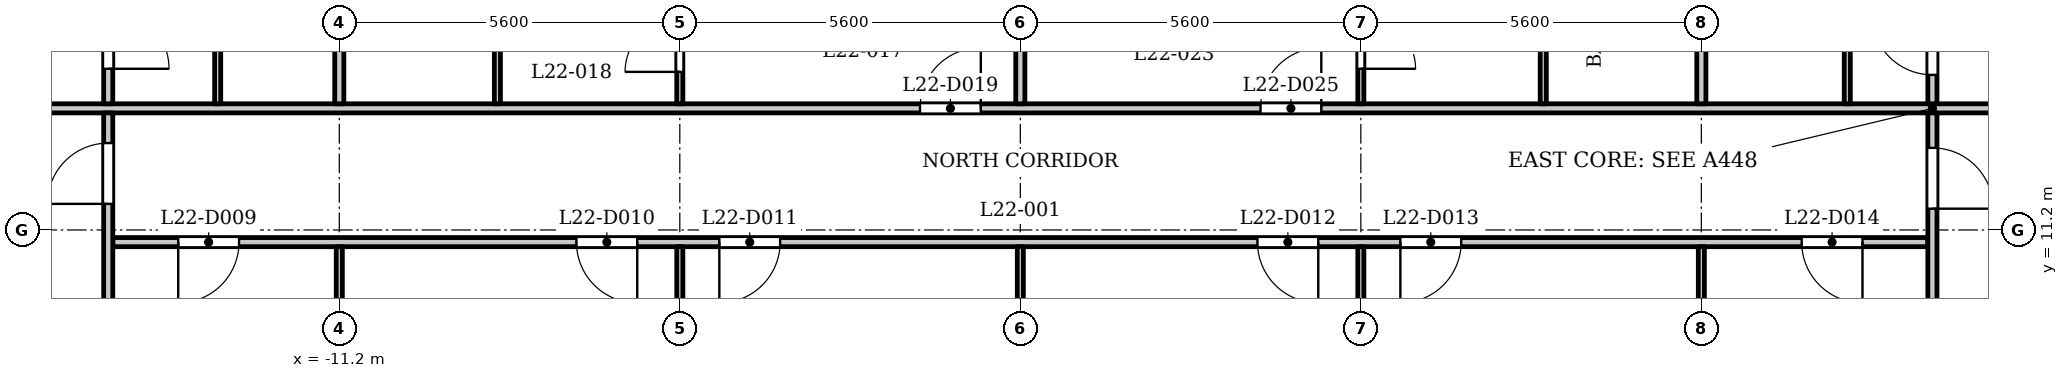
"""IFC4 building model, lengths in metres.
Left out: names, types, materials, properties, quantities, classifications, styles, units other than length and angle.
Written with IfcOpenShell. Run it as: python <this file> out.ifc"""

import sys

from ifc_helpers import new_model, si_unit, direction, frame, frame_2d, origin, place, context, subcontext, project, spatial, rectangle, extrude, element, fill, save


model = new_model("IFC4")
c1 = context("Model", 3, precision=1e-05, world=origin(), true_north=direction((0.0, 1.0)))
c2 = subcontext(c1, "Body", "Model", "MODEL_VIEW")
j1 = project(units=[si_unit("LENGTHUNIT", "METRE"), si_unit("PLANEANGLEUNIT", "RADIAN")], contexts=[c1])
p1 = place(None, origin())
s1 = spatial("IfcSite", under=j1, at=p1, CompositionType="ELEMENT")
p2 = place(p1, origin())
s2 = spatial("IfcBuilding", under=s1, at=p2, CompositionType="ELEMENT")
p3 = place(p2, frame((0.0, 0.0, 90.3)))
s3 = spatial("IfcBuildingStorey", under=s2, at=p3, CompositionType="ELEMENT", Elevation=90.3)
p4 = place(p3, frame((-14.925, 11.0, 0.0), z_axis=(0.0, 0.0, 1.0), x_axis=(1.0, 0.0, 0.0)))
e1 = element("IfcWall", 1, at=p4, inside=s3, PredefinedType="PARTITIONING", context=c2, shape_type="SweptSolid", body=[
    extrude(rectangle(XDim=29.85, YDim=0.15, at=frame_2d((14.925, 0.0))), origin(), (0.0, 0.0, 1.0), 3.2),
])
p5 = place(p4, frame((1.076, 0.0, 0.0)))
e2 = element("IfcOpeningElement", 2, at=p5, cuts=e1, PredefinedType="OPENING", context=c2, shape_type="SweptSolid", body=[
    extrude(rectangle(XDim=1.0, YDim=2.1, at=frame_2d((0.5, 1.05))), frame((0.0, 0.085, 0.0), z_axis=(0.0, -1.0, 0.0), x_axis=(1.0, 0.0, 0.0)), (0.0, 0.0, 1.0), 0.17),
])
p6 = place(p4, frame((7.625, 0.0, 0.0)))
e3 = element("IfcOpeningElement", 3, at=p6, cuts=e1, PredefinedType="OPENING", context=c2, shape_type="SweptSolid", body=[
    extrude(rectangle(XDim=1.0, YDim=2.1, at=frame_2d((0.5, 1.05))), frame((0.0, 0.085, 0.0), z_axis=(0.0, -1.0, 0.0), x_axis=(1.0, 0.0, 0.0)), (0.0, 0.0, 1.0), 0.17),
])
p7 = place(p4, frame((9.975, 0.0, 0.0)))
e4 = element("IfcOpeningElement", 4, at=p7, cuts=e1, PredefinedType="OPENING", context=c2, shape_type="SweptSolid", body=[
    extrude(rectangle(XDim=1.0, YDim=2.1, at=frame_2d((0.5, 1.05))), frame((0.0, 0.085, 0.0), z_axis=(0.0, -1.0, 0.0), x_axis=(1.0, 0.0, 0.0)), (0.0, 0.0, 1.0), 0.17),
])
p8 = place(p4, frame((18.825, 0.0, 0.0)))
e5 = element("IfcOpeningElement", 5, at=p8, cuts=e1, PredefinedType="OPENING", context=c2, shape_type="SweptSolid", body=[
    extrude(rectangle(XDim=1.0, YDim=2.1, at=frame_2d((0.5, 1.05))), frame((0.0, 0.085, 0.0), z_axis=(0.0, -1.0, 0.0), x_axis=(1.0, 0.0, 0.0)), (0.0, 0.0, 1.0), 0.17),
])
p9 = place(p4, frame((21.175, 0.0, 0.0)))
e6 = element("IfcOpeningElement", 6, at=p9, cuts=e1, PredefinedType="OPENING", context=c2, shape_type="SweptSolid", body=[
    extrude(rectangle(XDim=1.0, YDim=2.1, at=frame_2d((0.5, 1.05))), frame((0.0, 0.085, 0.0), z_axis=(0.0, -1.0, 0.0), x_axis=(1.0, 0.0, 0.0)), (0.0, 0.0, 1.0), 0.17),
])
p10 = place(p4, frame((27.775, 0.0, 0.0)))
e7 = element("IfcOpeningElement", 7, at=p10, cuts=e1, PredefinedType="OPENING", context=c2, shape_type="SweptSolid", body=[
    extrude(rectangle(XDim=1.0, YDim=2.1, at=frame_2d((0.5, 1.05))), frame((0.0, 0.085, 0.0), z_axis=(0.0, -1.0, 0.0), x_axis=(1.0, 0.0, 0.0)), (0.0, 0.0, 1.0), 0.17),
])
p11 = place(p3, frame((-17.4, 13.2, 0.0), z_axis=(0.0, 0.0, 1.0), x_axis=(1.0, 0.0, 0.0)))
e8 = element("IfcWall", 8, at=p11, inside=s3, PredefinedType="PARTITIONING", context=c2, shape_type="SweptSolid", body=[
    extrude(rectangle(XDim=34.8, YDim=0.15, at=frame_2d((17.4, 0.0))), origin(), (0.0, 0.0, 1.0), 3.2),
])
p12 = place(p11, frame((0.25, 0.0, 0.0)))
e9 = element("IfcOpeningElement", 9, at=p12, cuts=e8, PredefinedType="OPENING", context=c2, shape_type="SweptSolid", body=[
    extrude(rectangle(XDim=1.0, YDim=2.1, at=frame_2d((0.5, 1.05))), frame((0.0, 0.085, 0.0), z_axis=(0.0, -1.0, 0.0), x_axis=(1.0, 0.0, 0.0)), (0.0, 0.0, 1.0), 0.17),
])
p13 = place(p11, frame((33.65, 0.0, 0.0)))
e10 = element("IfcOpeningElement", 10, at=p13, cuts=e8, PredefinedType="OPENING", context=c2, shape_type="SweptSolid", body=[
    extrude(rectangle(XDim=1.0, YDim=2.1, at=frame_2d((0.5, 1.05))), frame((0.0, 0.085, 0.0), z_axis=(0.0, -1.0, 0.0), x_axis=(1.0, 0.0, 0.0)), (0.0, 0.0, 1.0), 0.17),
])
p14 = place(p11, frame((15.75, 0.0, 0.0)))
e11 = element("IfcOpeningElement", 11, at=p14, cuts=e8, PredefinedType="OPENING", context=c2, shape_type="SweptSolid", body=[
    extrude(rectangle(XDim=1.0, YDim=2.1, at=frame_2d((0.5, 1.05))), frame((0.0, 0.085, 0.0), z_axis=(0.0, -1.0, 0.0), x_axis=(1.0, 0.0, 0.0)), (0.0, 0.0, 1.0), 0.17),
])
p15 = place(p11, frame((21.35, 0.0, 0.0)))
e12 = element("IfcOpeningElement", 12, at=p15, cuts=e8, PredefinedType="OPENING", context=c2, shape_type="SweptSolid", body=[
    extrude(rectangle(XDim=1.0, YDim=2.1, at=frame_2d((0.5, 1.05))), frame((0.0, 0.085, 0.0), z_axis=(0.0, -1.0, 0.0), x_axis=(1.0, 0.0, 0.0)), (0.0, 0.0, 1.0), 0.17),
])
p16 = place(p3, frame((-15.0, 6.769, 0.0), z_axis=(0.0, 0.0, 1.0), x_axis=(0.0, 1.0, 0.0)))
e13 = element("IfcWall", 13, at=p16, inside=s3, PredefinedType="PARTITIONING", context=c2, shape_type="SweptSolid", body=[
    extrude(rectangle(XDim=6.356, YDim=0.15, at=frame_2d((3.178, 0.0))), origin(), (0.0, 0.0, 1.0), 3.2),
])
p17 = place(p16, frame((4.86, 0.0, 0.0)))
e14 = element("IfcOpeningElement", 14, at=p17, cuts=e13, PredefinedType="OPENING", context=c2, shape_type="SweptSolid", body=[
    extrude(rectangle(XDim=1.0, YDim=2.1, at=frame_2d((0.5, 1.05))), frame((0.0, 0.085, 0.0), z_axis=(0.0, -1.0, 0.0), x_axis=(1.0, 0.0, 0.0)), (0.0, 0.0, 1.0), 0.17),
])
p18 = place(p3, frame((-15.0, 13.275, 0.0), z_axis=(0.0, 0.0, 1.0), x_axis=(0.0, 1.0, 0.0)))
e15 = element("IfcWall", 15, at=p18, inside=s3, PredefinedType="PARTITIONING", context=c2, shape_type="SweptSolid", body=[
    extrude(rectangle(XDim=2.05, YDim=0.15, at=frame_2d((1.025, 0.0))), origin(), (0.0, 0.0, 1.0), 3.2),
])
p19 = place(p18, frame((0.576, 0.0, 0.0)))
e16 = element("IfcOpeningElement", 16, at=p19, cuts=e15, PredefinedType="OPENING", context=c2, shape_type="SweptSolid", body=[
    extrude(rectangle(XDim=1.0, YDim=2.1, at=frame_2d((0.5, 1.05))), frame((0.0, 0.085, 0.0), z_axis=(0.0, -1.0, 0.0), x_axis=(1.0, 0.0, 0.0)), (0.0, 0.0, 1.0), 0.17),
])
p20 = place(p3, frame((-13.2, 13.275, 0.0), z_axis=(0.0, 0.0, 1.0), x_axis=(0.0, 1.0, 0.0)))
e17 = element("IfcWall", 17, at=p20, inside=s3, PredefinedType="PARTITIONING", context=c2, shape_type="SweptSolid", body=[
    extrude(rectangle(XDim=3.775, YDim=0.1, at=frame_2d((1.888, 0.0))), origin(), (0.0, 0.0, 1.0), 3.2),
])
p21 = place(p3, frame((-11.2, 7.32, 0.0), z_axis=(0.0, 0.0, 1.0), x_axis=(0.0, 1.0, 0.0)))
e18 = element("IfcWall", 18, at=p21, inside=s3, PredefinedType="PARTITIONING", context=c2, shape_type="SweptSolid", body=[
    extrude(rectangle(XDim=3.605, YDim=0.1, at=frame_2d((1.802, 0.0))), origin(), (0.0, 0.0, 1.0), 3.2),
])
p22 = place(p3, frame((-11.2, 13.275, 0.0), z_axis=(0.0, 0.0, 1.0), x_axis=(0.0, 1.0, 0.0)))
e19 = element("IfcWall", 19, at=p22, inside=s3, PredefinedType="PARTITIONING", context=c2, shape_type="SweptSolid", body=[
    extrude(rectangle(XDim=3.775, YDim=0.15, at=frame_2d((1.888, 0.0))), origin(), (0.0, 0.0, 1.0), 3.2),
])
p23 = place(p3, frame((-8.6, 13.275, 0.0), z_axis=(0.0, 0.0, 1.0), x_axis=(0.0, 1.0, 0.0)))
e20 = element("IfcWall", 20, at=p23, inside=s3, PredefinedType="PARTITIONING", context=c2, shape_type="SweptSolid", body=[
    extrude(rectangle(XDim=3.775, YDim=0.1, at=frame_2d((1.888, 0.0))), origin(), (0.0, 0.0, 1.0), 3.2),
])
p24 = place(p3, frame((-5.6, 7.32, 0.0), z_axis=(0.0, 0.0, 1.0), x_axis=(0.0, 1.0, 0.0)))
e21 = element("IfcWall", 21, at=p24, inside=s3, PredefinedType="PARTITIONING", context=c2, shape_type="SweptSolid", body=[
    extrude(rectangle(XDim=3.605, YDim=0.1, at=frame_2d((1.802, 0.0))), origin(), (0.0, 0.0, 1.0), 3.2),
])
p25 = place(p3, frame((-5.6, 13.275, 0.0), z_axis=(0.0, 0.0, 1.0), x_axis=(0.0, 1.0, 0.0)))
e22 = element("IfcWall", 22, at=p25, inside=s3, PredefinedType="PARTITIONING", context=c2, shape_type="SweptSolid", body=[
    extrude(rectangle(XDim=3.775, YDim=0.1, at=frame_2d((1.888, 0.0))), origin(), (0.0, 0.0, 1.0), 3.2),
])
p26 = place(p25, frame((0.525, 0.0, 0.0)))
e23 = element("IfcOpeningElement", 23, at=p26, cuts=e22, PredefinedType="OPENING", context=c2, shape_type="SweptSolid", body=[
    extrude(rectangle(XDim=0.9, YDim=2.1, at=frame_2d((0.45, 1.05))), frame((0.0, 0.06, 0.0), z_axis=(0.0, -1.0, 0.0), x_axis=(1.0, 0.0, 0.0)), (0.0, 0.0, 1.0), 0.12),
])
p27 = place(p3, frame((0.0, 7.32, 0.0), z_axis=(0.0, 0.0, 1.0), x_axis=(0.0, 1.0, 0.0)))
e24 = element("IfcWall", 24, at=p27, inside=s3, PredefinedType="PARTITIONING", context=c2, shape_type="SweptSolid", body=[
    extrude(rectangle(XDim=3.605, YDim=0.1, at=frame_2d((1.802, 0.0))), origin(), (0.0, 0.0, 1.0), 3.2),
])
p28 = place(p3, frame((0.0, 13.275, 0.0), z_axis=(0.0, 0.0, 1.0), x_axis=(0.0, 1.0, 0.0)))
e25 = element("IfcWall", 25, at=p28, inside=s3, PredefinedType="PARTITIONING", context=c2, shape_type="SweptSolid", body=[
    extrude(rectangle(XDim=3.775, YDim=0.15, at=frame_2d((1.888, 0.0))), origin(), (0.0, 0.0, 1.0), 3.2),
])
p29 = place(p3, frame((5.6, 7.32, 0.0), z_axis=(0.0, 0.0, 1.0), x_axis=(0.0, 1.0, 0.0)))
e26 = element("IfcWall", 26, at=p29, inside=s3, PredefinedType="PARTITIONING", context=c2, shape_type="SweptSolid", body=[
    extrude(rectangle(XDim=3.605, YDim=0.1, at=frame_2d((1.802, 0.0))), origin(), (0.0, 0.0, 1.0), 3.2),
])
p30 = place(p3, frame((5.6, 13.275, 0.0), z_axis=(0.0, 0.0, 1.0), x_axis=(0.0, 1.0, 0.0)))
e27 = element("IfcWall", 27, at=p30, inside=s3, PredefinedType="PARTITIONING", context=c2, shape_type="SweptSolid", body=[
    extrude(rectangle(XDim=3.775, YDim=0.1, at=frame_2d((1.888, 0.0))), origin(), (0.0, 0.0, 1.0), 3.2),
])
p31 = place(p30, frame((0.576, 0.0, 0.0)))
e28 = element("IfcOpeningElement", 28, at=p31, cuts=e27, PredefinedType="OPENING", context=c2, shape_type="SweptSolid", body=[
    extrude(rectangle(XDim=0.9, YDim=2.1, at=frame_2d((0.45, 1.05))), frame((0.0, 0.06, 0.0), z_axis=(0.0, -1.0, 0.0), x_axis=(1.0, 0.0, 0.0)), (0.0, 0.0, 1.0), 0.12),
])
p32 = place(p3, frame((8.6, 13.275, 0.0), z_axis=(0.0, 0.0, 1.0), x_axis=(0.0, 1.0, 0.0)))
e29 = element("IfcWall", 29, at=p32, inside=s3, PredefinedType="PARTITIONING", context=c2, shape_type="SweptSolid", body=[
    extrude(rectangle(XDim=3.775, YDim=0.1, at=frame_2d((1.888, 0.0))), origin(), (0.0, 0.0, 1.0), 3.2),
])
p33 = place(p3, frame((11.2, 7.32, 0.0), z_axis=(0.0, 0.0, 1.0), x_axis=(0.0, 1.0, 0.0)))
e30 = element("IfcWall", 30, at=p33, inside=s3, PredefinedType="PARTITIONING", context=c2, shape_type="SweptSolid", body=[
    extrude(rectangle(XDim=3.605, YDim=0.1, at=frame_2d((1.802, 0.0))), origin(), (0.0, 0.0, 1.0), 3.2),
])
p34 = place(p3, frame((11.2, 13.275, 0.0), z_axis=(0.0, 0.0, 1.0), x_axis=(0.0, 1.0, 0.0)))
e31 = element("IfcWall", 31, at=p34, inside=s3, PredefinedType="PARTITIONING", context=c2, shape_type="SweptSolid", body=[
    extrude(rectangle(XDim=3.775, YDim=0.15, at=frame_2d((1.888, 0.0))), origin(), (0.0, 0.0, 1.0), 3.2),
])
p35 = place(p3, frame((13.6, 13.275, 0.0), z_axis=(0.0, 0.0, 1.0), x_axis=(0.0, 1.0, 0.0)))
e32 = element("IfcWall", 32, at=p35, inside=s3, PredefinedType="PARTITIONING", context=c2, shape_type="SweptSolid", body=[
    extrude(rectangle(XDim=3.775, YDim=0.1, at=frame_2d((1.888, 0.0))), origin(), (0.0, 0.0, 1.0), 3.2),
])
p36 = place(p3, frame((15.0, 6.769, 0.0), z_axis=(0.0, 0.0, 1.0), x_axis=(0.0, 1.0, 0.0)))
e33 = element("IfcWall", 33, at=p36, inside=s3, PredefinedType="PARTITIONING", context=c2, shape_type="SweptSolid", body=[
    extrude(rectangle(XDim=6.356, YDim=0.15, at=frame_2d((3.178, 0.0))), origin(), (0.0, 0.0, 1.0), 3.2),
])
p37 = place(p36, frame((4.781, 0.0, 0.0)))
e34 = element("IfcOpeningElement", 34, at=p37, cuts=e33, PredefinedType="OPENING", context=c2, shape_type="SweptSolid", body=[
    extrude(rectangle(XDim=1.0, YDim=2.1, at=frame_2d((0.5, 1.05))), frame((0.0, 0.085, 0.0), z_axis=(0.0, -1.0, 0.0), x_axis=(1.0, 0.0, 0.0)), (0.0, 0.0, 1.0), 0.17),
])
p38 = place(p3, frame((15.0, 13.275, 0.0), z_axis=(0.0, 0.0, 1.0), x_axis=(0.0, 1.0, 0.0)))
e35 = element("IfcWall", 35, at=p38, inside=s3, PredefinedType="PARTITIONING", context=c2, shape_type="SweptSolid", body=[
    extrude(rectangle(XDim=2.05, YDim=0.15, at=frame_2d((1.025, 0.0))), origin(), (0.0, 0.0, 1.0), 3.2),
])
p39 = place(p38, frame((0.476, 0.0, 0.0)))
e36 = element("IfcOpeningElement", 36, at=p39, cuts=e35, PredefinedType="OPENING", context=c2, shape_type="SweptSolid", body=[
    extrude(rectangle(XDim=1.0, YDim=2.1, at=frame_2d((0.5, 1.05))), frame((0.0, 0.085, 0.0), z_axis=(0.0, -1.0, 0.0), x_axis=(1.0, 0.0, 0.0)), (0.0, 0.0, 1.0), 0.17),
])
p40 = place(p17, origin())
e37 = element("IfcDoor", 37, at=p40, inside=s3, OperationType="SINGLE_SWING_RIGHT", PredefinedType="DOOR", context=c2, shape_type="SweptSolid", body=[
    extrude(rectangle(XDim=1.0, YDim=2.1, at=frame_2d((0.5, 1.05))), frame((0.0, 0.025, 0.0), z_axis=(0.0, -1.0, 0.0), x_axis=(1.0, 0.0, 0.0)), (0.0, 0.0, 1.0), 0.05),
])
fill(e14, e37)
p41 = place(p37, origin())
e38 = element("IfcDoor", 38, at=p41, inside=s3, OperationType="SINGLE_SWING_LEFT", PredefinedType="DOOR", context=c2, shape_type="SweptSolid", body=[
    extrude(rectangle(XDim=1.0, YDim=2.1, at=frame_2d((0.5, 1.05))), frame((0.0, 0.025, 0.0), z_axis=(0.0, -1.0, 0.0), x_axis=(1.0, 0.0, 0.0)), (0.0, 0.0, 1.0), 0.05),
])
fill(e34, e38)
p42 = place(p5, origin())
e39 = element("IfcDoor", 39, at=p42, inside=s3, OperationType="SINGLE_SWING_LEFT", PredefinedType="DOOR", context=c2, shape_type="SweptSolid", body=[
    extrude(rectangle(XDim=1.0, YDim=2.1, at=frame_2d((0.5, 1.05))), frame((0.0, 0.025, 0.0), z_axis=(0.0, -1.0, 0.0), x_axis=(1.0, 0.0, 0.0)), (0.0, 0.0, 1.0), 0.05),
])
fill(e2, e39)
p43 = place(p6, origin())
e40 = element("IfcDoor", 40, at=p43, inside=s3, OperationType="SINGLE_SWING_RIGHT", PredefinedType="DOOR", context=c2, shape_type="SweptSolid", body=[
    extrude(rectangle(XDim=1.0, YDim=2.1, at=frame_2d((0.5, 1.05))), frame((0.0, 0.025, 0.0), z_axis=(0.0, -1.0, 0.0), x_axis=(1.0, 0.0, 0.0)), (0.0, 0.0, 1.0), 0.05),
])
fill(e3, e40)
p44 = place(p7, origin())
e41 = element("IfcDoor", 41, at=p44, inside=s3, OperationType="SINGLE_SWING_LEFT", PredefinedType="DOOR", context=c2, shape_type="SweptSolid", body=[
    extrude(rectangle(XDim=1.0, YDim=2.1, at=frame_2d((0.5, 1.05))), frame((0.0, 0.025, 0.0), z_axis=(0.0, -1.0, 0.0), x_axis=(1.0, 0.0, 0.0)), (0.0, 0.0, 1.0), 0.05),
])
fill(e4, e41)
p45 = place(p8, origin())
e42 = element("IfcDoor", 42, at=p45, inside=s3, OperationType="SINGLE_SWING_RIGHT", PredefinedType="DOOR", context=c2, shape_type="SweptSolid", body=[
    extrude(rectangle(XDim=1.0, YDim=2.1, at=frame_2d((0.5, 1.05))), frame((0.0, 0.025, 0.0), z_axis=(0.0, -1.0, 0.0), x_axis=(1.0, 0.0, 0.0)), (0.0, 0.0, 1.0), 0.05),
])
fill(e5, e42)
p46 = place(p9, origin())
e43 = element("IfcDoor", 43, at=p46, inside=s3, OperationType="SINGLE_SWING_LEFT", PredefinedType="DOOR", context=c2, shape_type="SweptSolid", body=[
    extrude(rectangle(XDim=1.0, YDim=2.1, at=frame_2d((0.5, 1.05))), frame((0.0, 0.025, 0.0), z_axis=(0.0, -1.0, 0.0), x_axis=(1.0, 0.0, 0.0)), (0.0, 0.0, 1.0), 0.05),
])
fill(e6, e43)
p47 = place(p10, origin())
e44 = element("IfcDoor", 44, at=p47, inside=s3, OperationType="SINGLE_SWING_RIGHT", PredefinedType="DOOR", context=c2, shape_type="SweptSolid", body=[
    extrude(rectangle(XDim=1.0, YDim=2.1, at=frame_2d((0.5, 1.05))), frame((0.0, 0.025, 0.0), z_axis=(0.0, -1.0, 0.0), x_axis=(1.0, 0.0, 0.0)), (0.0, 0.0, 1.0), 0.05),
])
fill(e7, e44)
p48 = place(p19, origin())
e45 = element("IfcDoor", 45, at=p48, inside=s3, OperationType="SINGLE_SWING_LEFT", PredefinedType="DOOR", context=c2, shape_type="SweptSolid", body=[
    extrude(rectangle(XDim=1.0, YDim=2.1, at=frame_2d((0.5, 1.05))), frame((0.0, 0.025, 0.0), z_axis=(0.0, -1.0, 0.0), x_axis=(1.0, 0.0, 0.0)), (0.0, 0.0, 1.0), 0.05),
])
fill(e16, e45)
p49 = place(p14, origin())
e46 = element("IfcDoor", 46, at=p49, inside=s3, OperationType="SINGLE_SWING_LEFT", PredefinedType="DOOR", context=c2, shape_type="SweptSolid", body=[
    extrude(rectangle(XDim=1.0, YDim=2.1, at=frame_2d((0.5, 1.05))), frame((0.0, 0.025, 0.0), z_axis=(0.0, -1.0, 0.0), x_axis=(1.0, 0.0, 0.0)), (0.0, 0.0, 1.0), 0.05),
])
fill(e11, e46)
p50 = place(p26, origin())
e47 = element("IfcDoor", 47, at=p50, inside=s3, OperationType="SINGLE_SWING_RIGHT", PredefinedType="DOOR", context=c2, shape_type="SweptSolid", body=[
    extrude(rectangle(XDim=0.9, YDim=2.1, at=frame_2d((0.45, 1.05))), frame((0.0, 0.025, 0.0), z_axis=(0.0, -1.0, 0.0), x_axis=(1.0, 0.0, 0.0)), (0.0, 0.0, 1.0), 0.05),
])
fill(e23, e47)
p51 = place(p15, origin())
e48 = element("IfcDoor", 48, at=p51, inside=s3, OperationType="SINGLE_SWING_LEFT", PredefinedType="DOOR", context=c2, shape_type="SweptSolid", body=[
    extrude(rectangle(XDim=1.0, YDim=2.1, at=frame_2d((0.5, 1.05))), frame((0.0, 0.025, 0.0), z_axis=(0.0, -1.0, 0.0), x_axis=(1.0, 0.0, 0.0)), (0.0, 0.0, 1.0), 0.05),
])
fill(e12, e48)
p52 = place(p31, origin())
e49 = element("IfcDoor", 49, at=p52, inside=s3, OperationType="SINGLE_SWING_LEFT", PredefinedType="DOOR", context=c2, shape_type="SweptSolid", body=[
    extrude(rectangle(XDim=0.9, YDim=2.1, at=frame_2d((0.45, 1.05))), frame((0.0, 0.025, 0.0), z_axis=(0.0, -1.0, 0.0), x_axis=(1.0, 0.0, 0.0)), (0.0, 0.0, 1.0), 0.05),
])
fill(e28, e49)
p53 = place(p39, origin())
e50 = element("IfcDoor", 50, at=p53, inside=s3, OperationType="SINGLE_SWING_LEFT", PredefinedType="DOOR", context=c2, shape_type="SweptSolid", body=[
    extrude(rectangle(XDim=1.0, YDim=2.1, at=frame_2d((0.5, 1.05))), frame((0.0, 0.025, 0.0), z_axis=(0.0, -1.0, 0.0), x_axis=(1.0, 0.0, 0.0)), (0.0, 0.0, 1.0), 0.05),
])
fill(e36, e50)
save(model, sys.argv[1])
